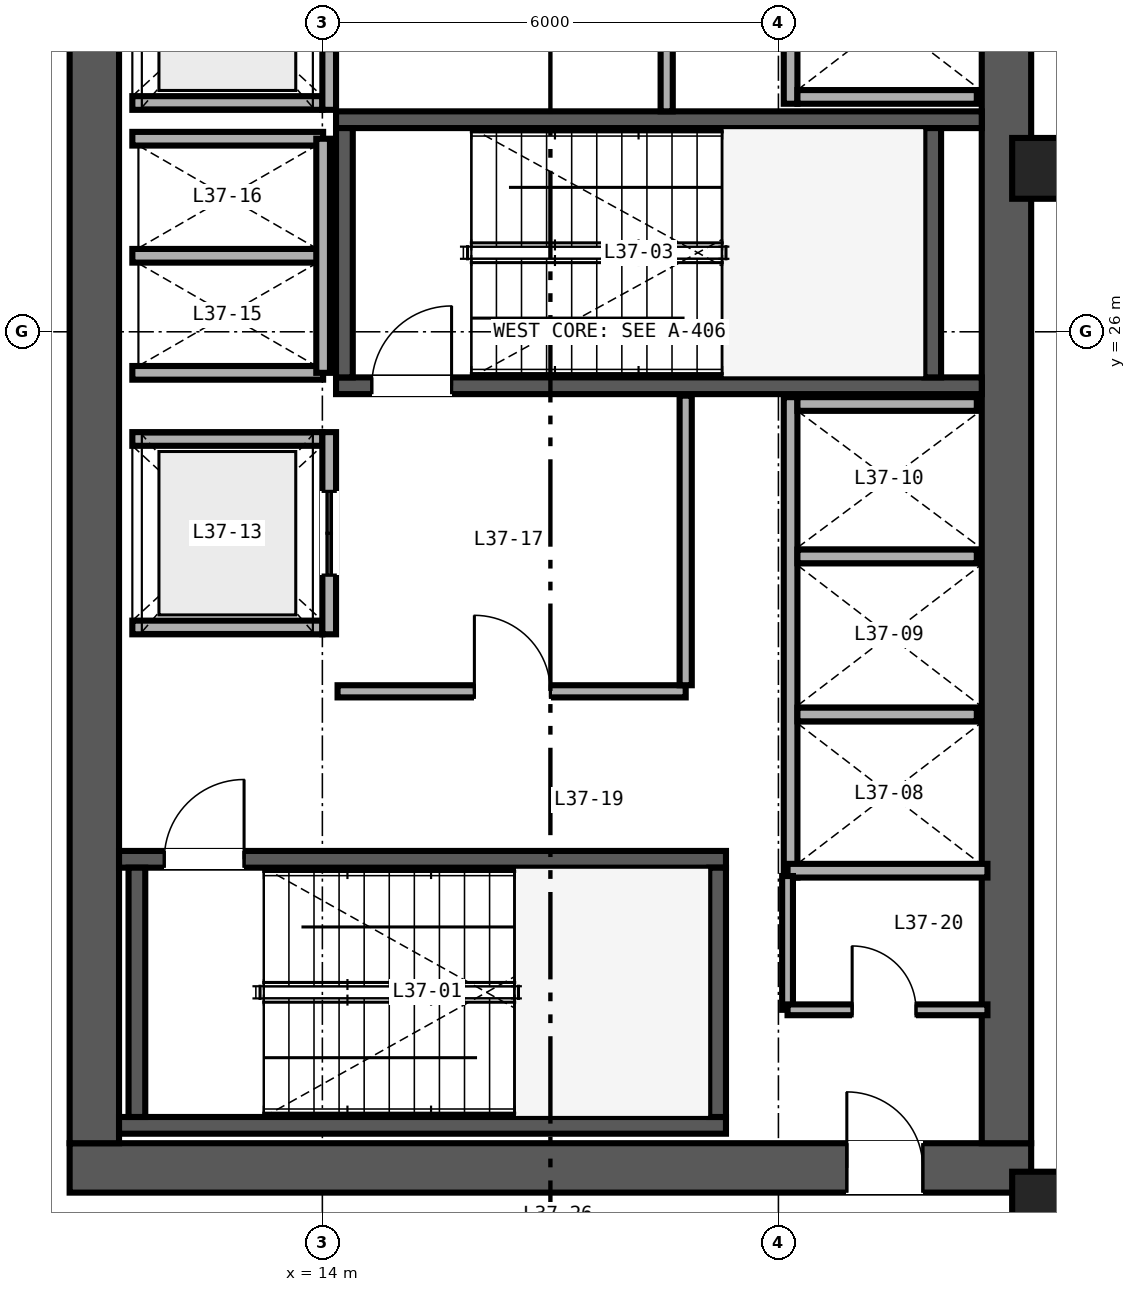
"""IFC4 building model, lengths in metres.
Left out: names, types, materials, properties, quantities, classifications, styles, units other than length and angle.
Written with IfcOpenShell. Run it as: python <this file> out.ifc"""

import sys

from ifc_helpers import new_model, si_unit, direction, frame, frame_2d, origin, origin_2d, place, context, subcontext, project, spatial, rectangle, hollow_rectangle, extrude, source, transform, mapped, element, fill, save


model = new_model("IFC4")
c1 = context("Model", 3, precision=1e-05, world=origin(), true_north=direction((0.0, 1.0)))
c2 = subcontext(c1, "Body", "Model", "MODEL_VIEW")
j1 = project(units=[si_unit("LENGTHUNIT", "METRE"), si_unit("PLANEANGLEUNIT", "RADIAN")], contexts=[c1])
p1 = place(None, origin())
s1 = spatial("IfcSite", under=j1, at=p1, CompositionType="ELEMENT")
p2 = place(p1, origin())
s2 = spatial("IfcBuilding", under=s1, at=p2, CompositionType="ELEMENT")
p3 = place(p2, frame((0.0, 0.0, 147.6)))
s3 = spatial("IfcBuildingStorey", under=s2, at=p3, CompositionType="ELEMENT", Elevation=147.6)
p4 = place(p3, frame((10.675, 15.0, 0.0), z_axis=(0.0, 0.0, 1.0), x_axis=(1.0, 0.0, 0.0)))
e1 = element("IfcWall", 1, at=p4, inside=s3, PredefinedType="SHEAR", context=c2, shape_type="SweptSolid", body=[
    extrude(rectangle(XDim=12.65, YDim=0.65, at=frame_2d((6.325, 0.0))), origin(), (0.0, 0.0, 1.0), 3.28),
])
p5 = place(p4, frame((10.225, 0.0, 0.0)))
e2 = element("IfcOpeningElement", 2, at=p5, cuts=e1, PredefinedType="OPENING", context=c2, shape_type="SweptSolid", body=[
    extrude(rectangle(XDim=1.0, YDim=2.15, at=frame_2d((0.5, 1.075))), frame((0.0, 0.335, 0.0), z_axis=(0.0, -1.0, 0.0), x_axis=(1.0, 0.0, 0.0)), (0.0, 0.0, 1.0), 0.67),
])
for number, where, z_axis, x_axis in (
    (3, (11.0, 15.325, 0.0), (0.0, 0.0, 1.0), (0.0, 1.0, 0.0)),
    (4, (23.0, 15.325, 0.0), (0.0, 0.0, 1.0), (0.0, 1.0, 0.0)),
):
    element("IfcWall", number, at=place(p3, frame(where, z_axis=z_axis, x_axis=x_axis)), inside=s3, PredefinedType="SHEAR", context=c2, shape_type="SweptSolid", body=[
        extrude(rectangle(XDim=21.35, YDim=0.65, at=frame_2d((10.675, 0.0))), origin(), (0.0, 0.0, 1.0), 3.28),
    ])
p6 = place(p3, frame((11.325, 15.56, 0.0), z_axis=(0.0, 0.0, 1.0), x_axis=(1.0, 0.0, 0.0)))
e5 = element("IfcWall", 5, at=p6, inside=s3, PredefinedType="SHEAR", context=c2, shape_type="SweptSolid", body=[
    extrude(rectangle(XDim=7.985, YDim=0.22, at=frame_2d((3.993, 0.0))), origin(), (0.0, 0.0, 1.0), 3.4),
])
p7 = place(p3, frame((11.325, 19.06, 0.0), z_axis=(0.0, 0.0, 1.0), x_axis=(1.0, 0.0, 0.0)))
e6 = element("IfcWall", 6, at=p7, inside=s3, PredefinedType="SHEAR", context=c2, shape_type="SweptSolid", body=[
    extrude(rectangle(XDim=7.985, YDim=0.22, at=frame_2d((3.993, 0.0))), origin(), (0.0, 0.0, 1.0), 3.4),
])
p8 = place(p7, frame((0.595, 0.0, 0.0)))
e7 = element("IfcOpeningElement", 7, at=p8, cuts=e6, PredefinedType="OPENING", context=c2, shape_type="SweptSolid", body=[
    extrude(rectangle(XDim=1.05, YDim=2.15, at=frame_2d((0.525, 1.075))), frame((0.0, 0.12, 0.0), z_axis=(0.0, -1.0, 0.0), x_axis=(1.0, 0.0, 0.0)), (0.0, 0.0, 1.0), 0.24),
])
for number, where, z_axis, x_axis in (
    (8, (11.56, 15.67, 0.0), (0.0, 0.0, 1.0), (0.0, 1.0, 0.0)),
    (9, (19.2, 15.67, 0.0), (0.0, 0.0, 1.0), (0.0, 1.0, 0.0)),
):
    element("IfcWall", number, at=place(p3, frame(where, z_axis=z_axis, x_axis=x_axis)), inside=s3, PredefinedType="SHEAR", context=c2, shape_type="SweptSolid", body=[
        extrude(rectangle(XDim=3.28, YDim=0.22, at=frame_2d((1.64, 0.0))), origin(), (0.0, 0.0, 1.0), 3.4),
    ])
p9 = place(p3, frame((14.18, 25.29, 0.0), z_axis=(0.0, 0.0, 1.0), x_axis=(1.0, 0.0, 0.0)))
e10 = element("IfcWall", 10, at=p9, inside=s3, PredefinedType="SHEAR", context=c2, shape_type="SweptSolid", body=[
    extrude(rectangle(XDim=8.495, YDim=0.22, at=frame_2d((4.248, 0.0))), origin(), (0.0, 0.0, 1.0), 3.4),
])
p10 = place(p9, frame((0.47, 0.0, 0.0)))
e11 = element("IfcOpeningElement", 11, at=p10, cuts=e10, PredefinedType="OPENING", context=c2, shape_type="SweptSolid", body=[
    extrude(rectangle(XDim=1.05, YDim=2.15, at=frame_2d((0.525, 1.075))), frame((0.0, 0.12, 0.0), z_axis=(0.0, -1.0, 0.0), x_axis=(1.0, 0.0, 0.0)), (0.0, 0.0, 1.0), 0.24),
])
p11 = place(p3, frame((14.18, 28.79, 0.0), z_axis=(0.0, 0.0, 1.0), x_axis=(1.0, 0.0, 0.0)))
e12 = element("IfcWall", 12, at=p11, inside=s3, PredefinedType="SHEAR", context=c2, shape_type="SweptSolid", body=[
    extrude(rectangle(XDim=8.495, YDim=0.22, at=frame_2d((4.248, 0.0))), origin(), (0.0, 0.0, 1.0), 3.4),
])
for number, where, z_axis, x_axis in (
    (13, (14.29, 25.4, 0.0), (0.0, 0.0, 1.0), (0.0, 1.0, 0.0)),
    (14, (22.03, 25.4, 0.0), (0.0, 0.0, 1.0), (0.0, 1.0, 0.0)),
):
    element("IfcWall", number, at=place(p3, frame(where, z_axis=z_axis, x_axis=x_axis)), inside=s3, PredefinedType="SHEAR", context=c2, shape_type="SweptSolid", body=[
        extrude(rectangle(XDim=3.28, YDim=0.22, at=frame_2d((1.64, 0.0))), origin(), (0.0, 0.0, 1.0), 3.4),
    ])
m1 = source(origin(), c2, "Body", "SweptSolid", [
    extrude(hollow_rectangle(XDim=0.85, YDim=0.8, WallThickness=0.032, at=origin_2d()), origin(), (0.0, 0.0, 1.0), 3.28),
])
for number, where, z_axis, x_axis in (
    (15, (23.5, 14.55, 0.0), (0.0, 0.0, 1.0), (1.0, 0.0, 0.0)),
    (16, (23.5, 28.15, 0.0), (0.0, 0.0, 1.0), (1.0, 0.0, 0.0)),
):
    element("IfcColumn", number, at=place(p3, frame(where, z_axis=z_axis, x_axis=x_axis)), inside=s3, PredefinedType="COLUMN", context=c2, shape_type="MappedRepresentation", body=[
        mapped(m1, transform((0.0, 0.0, 0.0), scale=1.0)),
    ])
p12 = place(p3, frame((20.16, 18.82, 0.0), z_axis=(0.0, 0.0, 1.0), x_axis=(0.0, 1.0, 0.0)))
e17 = element("IfcWall", 17, at=p12, inside=s3, PredefinedType="SOLIDWALL", context=c2, shape_type="SweptSolid", body=[
    extrude(rectangle(XDim=6.32, YDim=0.18, at=frame_2d((3.16, 0.0))), origin(), (0.0, 0.0, 1.0), 2.36),
])
p13 = place(p3, frame((20.12, 18.91, 0.0), z_axis=(0.0, 0.0, 1.0), x_axis=(1.0, 0.0, 0.0)))
e18 = element("IfcWall", 18, at=p13, inside=s3, PredefinedType="SOLIDWALL", context=c2, shape_type="SweptSolid", body=[
    extrude(rectangle(XDim=2.63, YDim=0.18, at=frame_2d((1.315, 0.0))), origin(), (0.0, 0.0, 1.0), 3.28),
])
p14 = place(p3, frame((20.25, 25.05, 0.0), z_axis=(0.0, 0.0, 1.0), x_axis=(1.0, 0.0, 0.0)))
e19 = element("IfcWall", 19, at=p14, inside=s3, PredefinedType="SOLIDWALL", context=c2, shape_type="SweptSolid", body=[
    extrude(rectangle(XDim=2.36, YDim=0.18, at=frame_2d((1.18, 0.0))), origin(), (0.0, 0.0, 1.0), 3.28),
])
p15 = place(p3, frame((20.25, 20.965, 0.0), z_axis=(0.0, 0.0, 1.0), x_axis=(1.0, 0.0, 0.0)))
e20 = element("IfcWall", 20, at=p15, inside=s3, PredefinedType="SOLIDWALL", context=c2, shape_type="SweptSolid", body=[
    extrude(rectangle(XDim=2.36, YDim=0.18, at=frame_2d((1.18, 0.0))), origin(), (0.0, 0.0, 1.0), 2.36),
])
p16 = place(p3, frame((20.25, 23.045, 0.0), z_axis=(0.0, 0.0, 1.0), x_axis=(1.0, 0.0, 0.0)))
e21 = element("IfcWall", 21, at=p16, inside=s3, PredefinedType="SOLIDWALL", context=c2, shape_type="SweptSolid", body=[
    extrude(rectangle(XDim=2.36, YDim=0.18, at=frame_2d((1.18, 0.0))), origin(), (0.0, 0.0, 1.0), 3.28),
])
p17 = place(p3, frame((20.16, 29.0, 0.0), z_axis=(0.0, 0.0, 1.0), x_axis=(0.0, 1.0, 0.0)))
e22 = element("IfcWall", 22, at=p17, inside=s3, PredefinedType="SOLIDWALL", context=c2, shape_type="SweptSolid", body=[
    extrude(rectangle(XDim=4.29, YDim=0.18, at=frame_2d((2.145, 0.0))), origin(), (0.0, 0.0, 1.0), 3.28),
])
p18 = place(p3, frame((20.25, 29.09, 0.0), z_axis=(0.0, 0.0, 1.0), x_axis=(1.0, 0.0, 0.0)))
e23 = element("IfcWall", 23, at=p18, inside=s3, PredefinedType="SOLIDWALL", context=c2, shape_type="SweptSolid", body=[
    extrude(rectangle(XDim=2.36, YDim=0.18, at=frame_2d((1.18, 0.0))), origin(), (0.0, 0.0, 1.0), 3.28),
])
for number, where, z_axis, x_axis in (
    (24, (11.5, 22.11, 0.0), (0.0, 0.0, 1.0), (1.0, 0.0, 0.0)),
    (25, (11.5, 24.59, 0.0), (0.0, 0.0, 1.0), (1.0, 0.0, 0.0)),
):
    element("IfcWall", number, at=place(p3, frame(where, z_axis=z_axis, x_axis=x_axis)), inside=s3, PredefinedType="SOLIDWALL", context=c2, shape_type="SweptSolid", body=[
        extrude(rectangle(XDim=2.5, YDim=0.18, at=frame_2d((1.25, 0.0))), origin(), (0.0, 0.0, 1.0), 3.28),
    ])
p19 = place(p3, frame((14.09, 22.02, 0.0), z_axis=(0.0, 0.0, 1.0), x_axis=(0.0, 1.0, 0.0)))
e26 = element("IfcWall", 26, at=p19, inside=s3, PredefinedType="SOLIDWALL", context=c2, shape_type="SweptSolid", body=[
    extrude(rectangle(XDim=2.66, YDim=0.18, at=frame_2d((1.33, 0.0))), origin(), (0.0, 0.0, 1.0), 3.28),
])
p20 = place(p19, frame((0.78, 0.0, 0.0)))
e27 = element("IfcOpeningElement", 27, at=p20, cuts=e26, PredefinedType="OPENING", context=c2, shape_type="SweptSolid", body=[
    extrude(rectangle(XDim=1.1, YDim=2.2, at=frame_2d((0.55, 1.1))), frame((0.0, 0.1, 0.0), z_axis=(0.0, -1.0, 0.0), x_axis=(1.0, 0.0, 0.0)), (0.0, 0.0, 1.0), 0.2),
])
p21 = place(p3, frame((11.5, 29.01, 0.0), z_axis=(0.0, 0.0, 1.0), x_axis=(1.0, 0.0, 0.0)))
e28 = element("IfcWall", 28, at=p21, inside=s3, PredefinedType="SOLIDWALL", context=c2, shape_type="SweptSolid", body=[
    extrude(rectangle(XDim=2.5, YDim=0.18, at=frame_2d((1.25, 0.0))), origin(), (0.0, 0.0, 1.0), 3.28),
])
p22 = place(p3, frame((14.09, 28.92, 0.0), z_axis=(0.0, 0.0, 1.0), x_axis=(0.0, 1.0, 0.0)))
e29 = element("IfcWall", 29, at=p22, inside=s3, PredefinedType="SOLIDWALL", context=c2, shape_type="SweptSolid", body=[
    extrude(rectangle(XDim=2.66, YDim=0.18, at=frame_2d((1.33, 0.0))), origin(), (0.0, 0.0, 1.0), 3.28),
])
p23 = place(p22, frame((0.78, 0.0, 0.0)))
e30 = element("IfcOpeningElement", 30, at=p23, cuts=e29, PredefinedType="OPENING", context=c2, shape_type="SweptSolid", body=[
    extrude(rectangle(XDim=1.1, YDim=2.2, at=frame_2d((0.55, 1.1))), frame((0.0, 0.1, 0.0), z_axis=(0.0, -1.0, 0.0), x_axis=(1.0, 0.0, 0.0)), (0.0, 0.0, 1.0), 0.2),
])
for number, where, z_axis, x_axis in (
    (31, (11.5, 25.46, 0.0), (0.0, 0.0, 1.0), (1.0, 0.0, 0.0)),
    (32, (11.5, 27.0, 0.0), (0.0, 0.0, 1.0), (1.0, 0.0, 0.0)),
    (33, (11.5, 28.54, 0.0), (0.0, 0.0, 1.0), (1.0, 0.0, 0.0)),
):
    element("IfcWall", number, at=place(p3, frame(where, z_axis=z_axis, x_axis=x_axis)), inside=s3, PredefinedType="SOLIDWALL", context=c2, shape_type="SweptSolid", body=[
        extrude(rectangle(XDim=2.51, YDim=0.18, at=frame_2d((1.255, 0.0))), origin(), (0.0, 0.0, 1.0), 3.28),
    ])
p24 = place(p3, frame((14.01, 25.46, 0.0), z_axis=(0.0, 0.0, 1.0), x_axis=(0.0, 1.0, 0.0)))
e34 = element("IfcWall", 34, at=p24, inside=s3, PredefinedType="SOLIDWALL", context=c2, shape_type="SweptSolid", body=[
    extrude(rectangle(XDim=3.08, YDim=0.18, at=frame_2d((1.54, 0.0))), origin(), (0.0, 0.0, 1.0), 3.28),
])
p25 = place(p3, frame((14.2, 21.27, 0.0), z_axis=(0.0, 0.0, 1.0), x_axis=(1.0, 0.0, 0.0)))
e35 = element("IfcWall", 35, at=p25, inside=s3, PredefinedType="PARTITIONING", context=c2, shape_type="SweptSolid", body=[
    extrude(rectangle(XDim=4.58, YDim=0.16, at=frame_2d((2.29, 0.0))), origin(), (0.0, 0.0, 1.0), 3.28),
])
p26 = place(p25, frame((1.8, 0.0, 0.0)))
e36 = element("IfcOpeningElement", 36, at=p26, cuts=e35, PredefinedType="OPENING", context=c2, shape_type="SweptSolid", body=[
    extrude(rectangle(XDim=1.0, YDim=2.15, at=frame_2d((0.5, 1.075))), frame((0.0, 0.09, 0.0), z_axis=(0.0, -1.0, 0.0), x_axis=(1.0, 0.0, 0.0)), (0.0, 0.0, 1.0), 0.18),
])
p27 = place(p3, frame((18.78, 21.35, 0.0), z_axis=(0.0, 0.0, 1.0), x_axis=(0.0, 1.0, 0.0)))
e37 = element("IfcWall", 37, at=p27, inside=s3, PredefinedType="PARTITIONING", context=c2, shape_type="SweptSolid", body=[
    extrude(rectangle(XDim=3.81, YDim=0.16, at=frame_2d((1.905, 0.0))), origin(), (0.0, 0.0, 1.0), 3.28),
])
p28 = place(p3, frame((18.53, 28.9, 0.0), z_axis=(0.0, 0.0, 1.0), x_axis=(0.0, 1.0, 0.0)))
e38 = element("IfcWall", 38, at=p28, inside=s3, PredefinedType="PARTITIONING", context=c2, shape_type="SweptSolid", body=[
    extrude(rectangle(XDim=3.9, YDim=0.16, at=frame_2d((1.95, 0.0))), origin(), (0.0, 0.0, 1.0), 3.28),
])
p29 = place(p28, frame((1.5, 0.0, 0.0)))
e39 = element("IfcOpeningElement", 39, at=p29, cuts=e38, PredefinedType="OPENING", context=c2, shape_type="SweptSolid", body=[
    extrude(rectangle(XDim=1.0, YDim=2.15, at=frame_2d((0.5, 1.075))), frame((0.0, 0.09, 0.0), z_axis=(0.0, -1.0, 0.0), x_axis=(1.0, 0.0, 0.0)), (0.0, 0.0, 1.0), 0.18),
])
p30 = place(p3, frame((20.12, 17.08, 0.0), z_axis=(0.0, 0.0, 1.0), x_axis=(0.0, 1.0, 0.0)))
e40 = element("IfcWall", 40, at=p30, inside=s3, PredefinedType="PARTITIONING", context=c2, shape_type="SweptSolid", body=[
    extrude(rectangle(XDim=1.76, YDim=0.142, at=frame_2d((0.88, 0.0))), origin(), (0.0, 0.0, 1.0), 3.28),
])
p31 = place(p3, frame((20.12, 17.08, 0.0), z_axis=(0.0, 0.0, 1.0), x_axis=(1.0, 0.0, 0.0)))
e41 = element("IfcWall", 41, at=p31, inside=s3, PredefinedType="PARTITIONING", context=c2, shape_type="SweptSolid", body=[
    extrude(rectangle(XDim=2.63, YDim=0.142, at=frame_2d((1.315, 0.0))), origin(), (0.0, 0.0, 1.0), 3.28),
])
p32 = place(p31, frame((0.85, 0.0, 0.0)))
e42 = element("IfcOpeningElement", 42, at=p32, cuts=e41, PredefinedType="OPENING", context=c2, shape_type="SweptSolid", body=[
    extrude(rectangle(XDim=0.84, YDim=2.1, at=frame_2d((0.42, 1.05))), frame((0.0, 0.081, 0.0), z_axis=(0.0, -1.0, 0.0), x_axis=(1.0, 0.0, 0.0)), (0.0, 0.0, 1.0), 0.162),
])
m2 = source(origin(), c2, "Body", "SweptSolid", [
    extrude(rectangle(XDim=1.05, YDim=2.15, at=frame_2d((0.525, 1.075))), frame((0.0, 0.025, 0.0), z_axis=(0.0, -1.0, 0.0), x_axis=(1.0, 0.0, 0.0)), (0.0, 0.0, 1.0), 0.05),
])
p33 = place(p8, origin())
e43 = element("IfcDoor", 43, at=p33, inside=s3, OperationType="SINGLE_SWING_RIGHT", PredefinedType="DOOR", context=c2, shape_type="MappedRepresentation", body=[
    mapped(m2, transform((0.0, 0.0, 0.0), scale=1.0)),
])
fill(e7, e43)
p34 = place(p10, origin())
e44 = element("IfcDoor", 44, at=p34, inside=s3, OperationType="SINGLE_SWING_RIGHT", PredefinedType="DOOR", context=c2, shape_type="MappedRepresentation", body=[
    mapped(m2, transform((0.0, 0.0, 0.0), scale=1.0)),
])
fill(e11, e44)
m3 = source(origin(), c2, "Body", "SweptSolid", [
    extrude(rectangle(XDim=1.1, YDim=2.2, at=frame_2d((0.55, 1.1))), frame((0.0, 0.025, 0.0), z_axis=(0.0, -1.0, 0.0), x_axis=(1.0, 0.0, 0.0)), (0.0, 0.0, 1.0), 0.05),
])
p35 = place(p20, origin())
e45 = element("IfcDoor", 45, at=p35, inside=s3, OperationType="DOUBLE_DOOR_SLIDING", PredefinedType="DOOR", context=c2, shape_type="MappedRepresentation", body=[
    mapped(m3, transform((0.0, 0.0, 0.0), scale=1.0)),
])
fill(e27, e45)
m4 = source(origin(), c2, "Body", "SweptSolid", [
    extrude(rectangle(XDim=1.0, YDim=2.15, at=frame_2d((0.5, 1.075))), frame((0.0, 0.025, 0.0), z_axis=(0.0, -1.0, 0.0), x_axis=(1.0, 0.0, 0.0)), (0.0, 0.0, 1.0), 0.05),
])
p36 = place(p26, origin())
e46 = element("IfcDoor", 46, at=p36, inside=s3, OperationType="SINGLE_SWING_LEFT", PredefinedType="DOOR", context=c2, shape_type="MappedRepresentation", body=[
    mapped(m4, transform((0.0, 0.0, 0.0), scale=1.0)),
])
fill(e36, e46)
m5 = source(origin(), c2, "Body", "SweptSolid", [
    extrude(rectangle(XDim=0.84, YDim=2.1, at=frame_2d((0.42, 1.05))), frame((0.0, 0.025, 0.0), z_axis=(0.0, -1.0, 0.0), x_axis=(1.0, 0.0, 0.0)), (0.0, 0.0, 1.0), 0.05),
])
p37 = place(p32, origin())
e47 = element("IfcDoor", 47, at=p37, inside=s3, OperationType="SINGLE_SWING_LEFT", PredefinedType="DOOR", context=c2, shape_type="MappedRepresentation", body=[
    mapped(m5, transform((0.0, 0.0, 0.0), scale=1.0)),
])
fill(e42, e47)
p38 = place(p5, origin())
e48 = element("IfcDoor", 48, at=p38, inside=s3, OperationType="SINGLE_SWING_LEFT", PredefinedType="DOOR", context=c2, shape_type="MappedRepresentation", body=[
    mapped(m4, transform((0.0, 0.0, 0.0), scale=1.0)),
])
fill(e2, e48)
save(model, sys.argv[1])
